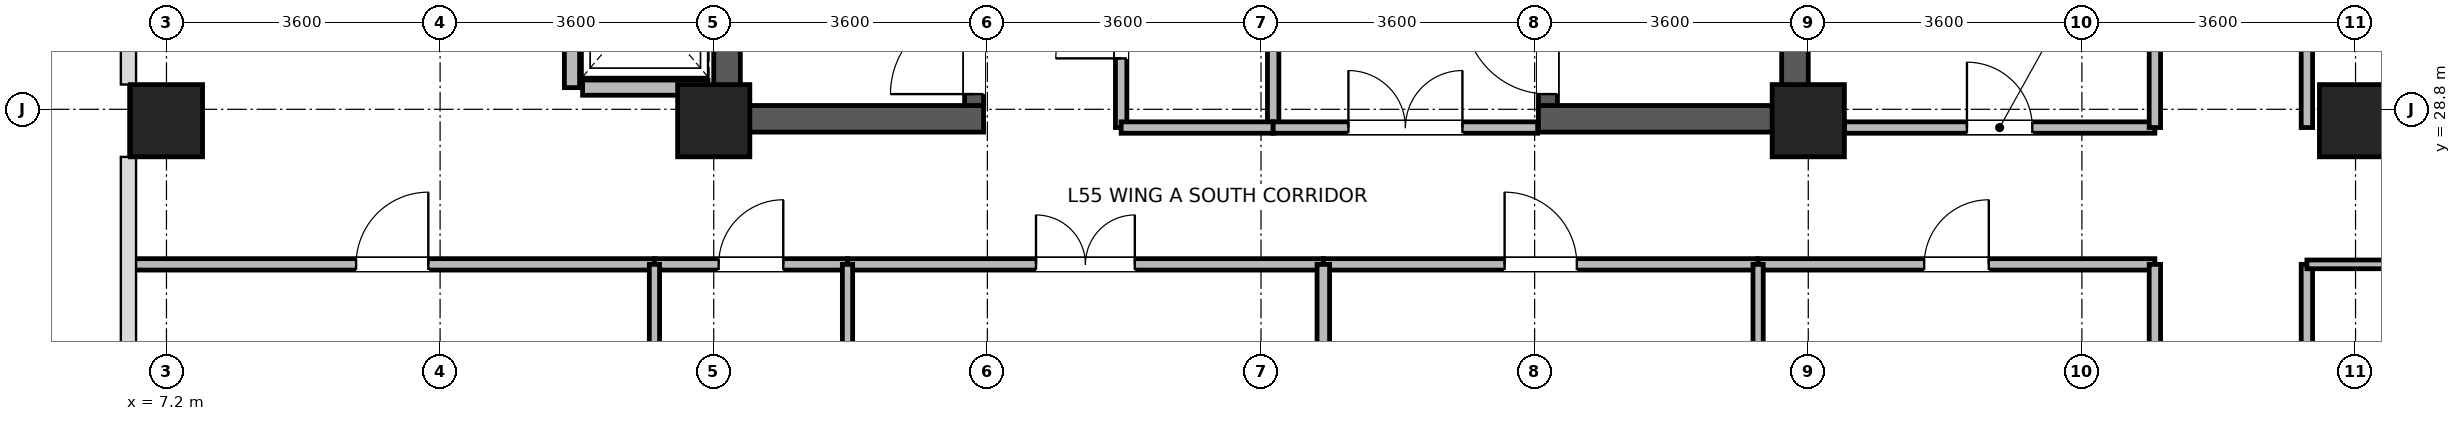
"""IFC4 building model, lengths in metres.
Left out: names, types, materials, properties, quantities, classifications, styles, units other than length and angle.
Written with IfcOpenShell. Run it as: python <this file> out.ifc"""

import sys

from ifc_helpers import new_model, si_unit, direction, frame, frame_2d, origin, origin_2d, place, context, subcontext, project, spatial, rectangle, extrude, source, transform, mapped, element, fill, save


model = new_model("IFC4")
c1 = context("Model", 3, precision=1e-05, world=origin(), true_north=direction((0.0, 1.0)))
c2 = subcontext(c1, "Body", "Model", "MODEL_VIEW")
j1 = project(units=[si_unit("LENGTHUNIT", "METRE"), si_unit("PLANEANGLEUNIT", "RADIAN")], contexts=[c1])
p1 = place(None, origin())
s1 = spatial("IfcSite", under=j1, at=p1, CompositionType="ELEMENT")
p2 = place(p1, origin())
s2 = spatial("IfcBuilding", under=s1, at=p2, CompositionType="ELEMENT")
p3 = place(p2, frame((0.0, 0.0, 216.6)))
s3 = spatial("IfcBuildingStorey", under=s2, at=p3, CompositionType="ELEMENT", Elevation=216.6)
for number, where, z_axis, x_axis in (
    (1, (14.575, 28.5, 0.0), (0.0, 0.0, 1.0), (0.0, 1.0, 0.0)),
    (2, (28.625, 28.5, 0.0), (0.0, 0.0, 1.0), (0.0, 1.0, 0.0)),
):
    element("IfcWall", number, at=place(p3, frame(where, z_axis=z_axis, x_axis=x_axis)), inside=s3, PredefinedType="SHEAR", context=c2, shape_type="SweptSolid", body=[
        extrude(rectangle(XDim=7.7, YDim=0.35, at=frame_2d((3.85, 0.0))), origin(), (0.0, 0.0, 1.0), 3.47),
    ])
for number, where, z_axis, x_axis in (
    (3, (14.75, 28.675, 0.0), (0.0, 0.0, 1.0), (1.0, 0.0, 0.0)),
    (4, (25.25, 28.675, 0.0), (0.0, 0.0, 1.0), (1.0, 0.0, 0.0)),
):
    element("IfcWall", number, at=place(p3, frame(where, z_axis=z_axis, x_axis=x_axis)), inside=s3, PredefinedType="SHEAR", context=c2, shape_type="SweptSolid", body=[
        extrude(rectangle(XDim=3.2, YDim=0.35, at=frame_2d((1.6, 0.0))), origin(), (0.0, 0.0, 1.0), 3.47),
    ])
p4 = place(p3, frame((17.825, 28.85, 0.0), z_axis=(0.0, 0.0, 1.0), x_axis=(0.0, 1.0, 0.0)))
e5 = element("IfcWall", 5, at=p4, inside=s3, PredefinedType="SHEAR", context=c2, shape_type="SweptSolid", body=[
    extrude(rectangle(XDim=7.0, YDim=0.25, at=frame_2d((3.5, 0.0))), origin(), (0.0, 0.0, 1.0), 3.47),
])
p5 = place(p4, frame((0.15, 0.0, 0.0)))
e6 = element("IfcOpeningElement", 6, at=p5, cuts=e5, PredefinedType="OPENING", context=c2, shape_type="SweptSolid", body=[
    extrude(rectangle(XDim=1.1, YDim=2.08, at=frame_2d((0.55, 1.04))), frame((0.0, 0.135, 0.0), z_axis=(0.0, -1.0, 0.0), x_axis=(1.0, 0.0, 0.0)), (0.0, 0.0, 1.0), 0.27),
])
p6 = place(p3, frame((25.375, 28.85, 0.0), z_axis=(0.0, 0.0, 1.0), x_axis=(0.0, 1.0, 0.0)))
e7 = element("IfcWall", 7, at=p6, inside=s3, PredefinedType="SHEAR", context=c2, shape_type="SweptSolid", body=[
    extrude(rectangle(XDim=7.0, YDim=0.25, at=frame_2d((3.5, 0.0))), origin(), (0.0, 0.0, 1.0), 3.47),
])
p7 = place(p6, frame((0.15, 0.0, 0.0)))
e8 = element("IfcOpeningElement", 8, at=p7, cuts=e7, PredefinedType="OPENING", context=c2, shape_type="SweptSolid", body=[
    extrude(rectangle(XDim=1.1, YDim=2.08, at=frame_2d((0.55, 1.04))), frame((0.0, 0.135, 0.0), z_axis=(0.0, -1.0, 0.0), x_axis=(1.0, 0.0, 0.0)), (0.0, 0.0, 1.0), 0.27),
])
m1 = source(origin(), c2, "Body", "SweptSolid", [
    extrude(rectangle(XDim=0.95, YDim=0.95, at=origin_2d()), origin(), (0.0, 0.0, 1.0), 3.7),
])
for number, where, z_axis, x_axis in (
    (9, (7.2, 28.65, 0.0), (0.0, 0.0, 1.0), (1.0, 0.0, 0.0)),
    (10, (14.4, 28.65, 0.0), (0.0, 0.0, 1.0), (1.0, 0.0, 0.0)),
    (11, (28.8, 28.65, 0.0), (0.0, 0.0, 1.0), (1.0, 0.0, 0.0)),
    (12, (36.0, 28.65, 0.0), (0.0, 0.0, 1.0), (1.0, 0.0, 0.0)),
):
    element("IfcColumn", number, at=place(p3, frame(where, z_axis=z_axis, x_axis=x_axis)), inside=s3, PredefinedType="COLUMN", context=c2, shape_type="MappedRepresentation", body=[
        mapped(m1, transform((0.0, 0.0, 0.0), x_axis=(1.0, 0.0, 0.0), y_axis=(0.0, 1.0, 0.0), z_axis=(0.0, 0.0, 1.0), scale=1.0)),
    ])
p8 = place(p3, frame((12.675, 29.085, 0.0), z_axis=(0.0, 0.0, 1.0), x_axis=(1.0, 0.0, 0.0)))
e13 = element("IfcWall", 13, at=p8, inside=s3, PredefinedType="PARTITIONING", context=c2, shape_type="SweptSolid", body=[
    extrude(rectangle(XDim=1.65, YDim=0.2, at=frame_2d((0.825, 0.0))), origin(), (0.0, 0.0, 1.0), 3.45),
])
p9 = place(p3, frame((12.535, 29.085, 0.0), z_axis=(0.0, 0.0, 1.0), x_axis=(0.0, 1.0, 0.0)))
e14 = element("IfcWall", 14, at=p9, inside=s3, PredefinedType="PARTITIONING", context=c2, shape_type="SweptSolid", body=[
    extrude(rectangle(XDim=2.23, YDim=0.2, at=frame_2d((1.115, 0.0))), origin(), (0.0, 0.0, 1.0), 3.45),
])
p10 = place(p3, frame((35.36, 16.96, 0.0), z_axis=(0.0, 0.0, 1.0), x_axis=(0.0, 1.0, 0.0)))
e15 = element("IfcWall", 15, at=p10, inside=s3, PredefinedType="PARTITIONING", context=c2, shape_type="SweptSolid", body=[
    extrude(rectangle(XDim=9.8, YDim=0.15, at=frame_2d((4.9, 0.0))), origin(), (0.0, 0.0, 1.0), 3.45),
])
p11 = place(p10, frame((2.486, 0.0, 0.0)))
e16 = element("IfcOpeningElement", 16, at=p11, cuts=e15, PredefinedType="OPENING", context=c2, shape_type="SweptSolid", body=[
    extrude(rectangle(XDim=1.3, YDim=2.12, at=frame_2d((0.65, 1.06))), frame((0.0, 0.085, 0.0), z_axis=(0.0, -1.0, 0.0), x_axis=(1.0, 0.0, 0.0)), (0.0, 0.0, 1.0), 0.17),
])
p12 = place(p3, frame((35.36, 28.56, 0.0), z_axis=(0.0, 0.0, 1.0), x_axis=(0.0, 1.0, 0.0)))
e17 = element("IfcWall", 17, at=p12, inside=s3, PredefinedType="PARTITIONING", context=c2, shape_type="SweptSolid", body=[
    extrude(rectangle(XDim=7.68, YDim=0.15, at=frame_2d((3.84, 0.0))), origin(), (0.0, 0.0, 1.0), 3.45),
])
p13 = place(p12, frame((3.19, 0.0, 0.0)))
e18 = element("IfcOpeningElement", 18, at=p13, cuts=e17, PredefinedType="OPENING", context=c2, shape_type="SweptSolid", body=[
    extrude(rectangle(XDim=1.3, YDim=2.12, at=frame_2d((0.65, 1.06))), frame((0.0, 0.085, 0.0), z_axis=(0.0, -1.0, 0.0), x_axis=(1.0, 0.0, 0.0)), (0.0, 0.0, 1.0), 0.17),
])
p14 = place(p3, frame((6.72, 26.76, 0.0), z_axis=(0.0, 0.0, 1.0), x_axis=(1.0, 0.0, 0.0)))
e19 = element("IfcWall", 19, at=p14, inside=s3, PredefinedType="PARTITIONING", context=c2, shape_type="SweptSolid", body=[
    extrude(rectangle(XDim=6.9, YDim=0.15, at=frame_2d((3.45, 0.0))), origin(), (0.0, 0.0, 1.0), 3.45),
])
p15 = place(p14, frame((2.975, 0.0, 0.0)))
e20 = element("IfcOpeningElement", 20, at=p15, cuts=e19, PredefinedType="OPENING", context=c2, shape_type="SweptSolid", body=[
    extrude(rectangle(XDim=0.95, YDim=2.1, at=frame_2d((0.475, 1.05))), frame((0.0, 0.085, 0.0), z_axis=(0.0, -1.0, 0.0), x_axis=(1.0, 0.0, 0.0)), (0.0, 0.0, 1.0), 0.17),
])
p16 = place(p3, frame((16.16, 26.76, 0.0), z_axis=(0.0, 0.0, 1.0), x_axis=(1.0, 0.0, 0.0)))
e21 = element("IfcWall", 21, at=p16, inside=s3, PredefinedType="PARTITIONING", context=c2, shape_type="SweptSolid", body=[
    extrude(rectangle(XDim=6.26, YDim=0.15, at=frame_2d((3.13, 0.0))), origin(), (0.0, 0.0, 1.0), 3.45),
])
p17 = place(p16, frame((2.48, 0.0, 0.0)))
e22 = element("IfcOpeningElement", 22, at=p17, cuts=e21, PredefinedType="OPENING", context=c2, shape_type="SweptSolid", body=[
    extrude(rectangle(XDim=1.3, YDim=2.12, at=frame_2d((0.65, 1.06))), frame((0.0, 0.085, 0.0), z_axis=(0.0, -1.0, 0.0), x_axis=(1.0, 0.0, 0.0)), (0.0, 0.0, 1.0), 0.17),
])
p18 = place(p3, frame((22.42, 26.76, 0.0), z_axis=(0.0, 0.0, 1.0), x_axis=(1.0, 0.0, 0.0)))
e23 = element("IfcWall", 23, at=p18, inside=s3, PredefinedType="PARTITIONING", context=c2, shape_type="SweptSolid", body=[
    extrude(rectangle(XDim=5.72, YDim=0.15, at=frame_2d((2.86, 0.0))), origin(), (0.0, 0.0, 1.0), 3.45),
])
p19 = place(p18, frame((2.385, 0.0, 0.0)))
e24 = element("IfcOpeningElement", 24, at=p19, cuts=e23, PredefinedType="OPENING", context=c2, shape_type="SweptSolid", body=[
    extrude(rectangle(XDim=0.95, YDim=2.1, at=frame_2d((0.475, 1.05))), frame((0.0, 0.085, 0.0), z_axis=(0.0, -1.0, 0.0), x_axis=(1.0, 0.0, 0.0)), (0.0, 0.0, 1.0), 0.17),
])
p20 = place(p3, frame((28.14, 26.76, 0.0), z_axis=(0.0, 0.0, 1.0), x_axis=(1.0, 0.0, 0.0)))
e25 = element("IfcWall", 25, at=p20, inside=s3, PredefinedType="PARTITIONING", context=c2, shape_type="SweptSolid", body=[
    extrude(rectangle(XDim=5.22, YDim=0.15, at=frame_2d((2.61, 0.0))), origin(), (0.0, 0.0, 1.0), 3.45),
])
p21 = place(p20, frame((2.185, 0.0, 0.0)))
e26 = element("IfcOpeningElement", 26, at=p21, cuts=e25, PredefinedType="OPENING", context=c2, shape_type="SweptSolid", body=[
    extrude(rectangle(XDim=0.85, YDim=2.04, at=frame_2d((0.425, 1.02))), frame((0.0, 0.085, 0.0), z_axis=(0.0, -1.0, 0.0), x_axis=(1.0, 0.0, 0.0)), (0.0, 0.0, 1.0), 0.17),
])
p22 = place(p3, frame((33.36, 21.6, 0.0), z_axis=(0.0, 0.0, 1.0), x_axis=(0.0, 1.0, 0.0)))
e27 = element("IfcWall", 27, at=p22, inside=s3, PredefinedType="PARTITIONING", context=c2, shape_type="SweptSolid", body=[
    extrude(rectangle(XDim=5.16, YDim=0.15, at=frame_2d((2.58, 0.0))), origin(), (0.0, 0.0, 1.0), 3.45),
])
p23 = place(p3, frame((29.275, 28.56, 0.0), z_axis=(0.0, 0.0, 1.0), x_axis=(1.0, 0.0, 0.0)))
e28 = element("IfcWall", 28, at=p23, inside=s3, PredefinedType="PARTITIONING", context=c2, shape_type="SweptSolid", body=[
    extrude(rectangle(XDim=4.085, YDim=0.15, at=frame_2d((2.042, 0.0))), origin(), (0.0, 0.0, 1.0), 2.9),
])
p24 = place(p23, frame((1.613, 0.0, 0.0)))
e29 = element("IfcOpeningElement", 29, at=p24, cuts=e28, PredefinedType="OPENING", context=c2, shape_type="SweptSolid", body=[
    extrude(rectangle(XDim=0.86, YDim=2.02, at=frame_2d((0.43, 1.01))), frame((0.0, 0.085, 0.0), z_axis=(0.0, -1.0, 0.0), x_axis=(1.0, 0.0, 0.0)), (0.0, 0.0, 1.0), 0.17),
])
p25 = place(p3, frame((33.36, 28.56, 0.0), z_axis=(0.0, 0.0, 1.0), x_axis=(0.0, 1.0, 0.0)))
e30 = element("IfcWall", 30, at=p25, inside=s3, PredefinedType="PARTITIONING", context=c2, shape_type="SweptSolid", body=[
    extrude(rectangle(XDim=3.08, YDim=0.15, at=frame_2d((1.54, 0.0))), origin(), (0.0, 0.0, 1.0), 3.45),
])
p26 = place(p3, frame((19.76, 28.56, 0.0), z_axis=(0.0, 0.0, 1.0), x_axis=(0.0, 1.0, 0.0)))
e31 = element("IfcWall", 31, at=p26, inside=s3, PredefinedType="PARTITIONING", context=c2, shape_type="SweptSolid", body=[
    extrude(rectangle(XDim=2.68, YDim=0.15, at=frame_2d((1.34, 0.0))), origin(), (0.0, 0.0, 1.0), 3.45),
])
p27 = place(p26, frame((0.91, 0.0, 0.0)))
e32 = element("IfcOpeningElement", 32, at=p27, cuts=e31, PredefinedType="OPENING", context=c2, shape_type="SweptSolid", body=[
    extrude(rectangle(XDim=0.86, YDim=2.02, at=frame_2d((0.43, 1.01))), frame((0.0, 0.085, 0.0), z_axis=(0.0, -1.0, 0.0), x_axis=(1.0, 0.0, 0.0)), (0.0, 0.0, 1.0), 0.17),
])
p28 = place(p3, frame((21.76, 28.56, 0.0), z_axis=(0.0, 0.0, 1.0), x_axis=(0.0, 1.0, 0.0)))
e33 = element("IfcWall", 33, at=p28, inside=s3, PredefinedType="PARTITIONING", context=c2, shape_type="SweptSolid", body=[
    extrude(rectangle(XDim=2.68, YDim=0.15, at=frame_2d((1.34, 0.0))), origin(), (0.0, 0.0, 1.0), 3.45),
])
p29 = place(p3, frame((13.62, 26.76, 0.0), z_axis=(0.0, 0.0, 1.0), x_axis=(1.0, 0.0, 0.0)))
e34 = element("IfcWall", 34, at=p29, inside=s3, PredefinedType="PARTITIONING", context=c2, shape_type="SweptSolid", body=[
    extrude(rectangle(XDim=2.54, YDim=0.15, at=frame_2d((1.27, 0.0))), origin(), (0.0, 0.0, 1.0), 3.45),
])
p30 = place(p29, frame((0.845, 0.0, 0.0)))
e35 = element("IfcOpeningElement", 35, at=p30, cuts=e34, PredefinedType="OPENING", context=c2, shape_type="SweptSolid", body=[
    extrude(rectangle(XDim=0.85, YDim=2.04, at=frame_2d((0.425, 1.02))), frame((0.0, 0.085, 0.0), z_axis=(0.0, -1.0, 0.0), x_axis=(1.0, 0.0, 0.0)), (0.0, 0.0, 1.0), 0.17),
])
p31 = place(p3, frame((19.76, 28.56, 0.0), z_axis=(0.0, 0.0, 1.0), x_axis=(1.0, 0.0, 0.0)))
e36 = element("IfcWall", 36, at=p31, inside=s3, PredefinedType="PARTITIONING", context=c2, shape_type="SweptSolid", body=[
    extrude(rectangle(XDim=2.0, YDim=0.15, at=frame_2d((1.0, 0.0))), origin(), (0.0, 0.0, 1.0), 2.55),
])
p32 = place(p3, frame((35.36, 26.76, 0.0), z_axis=(0.0, 0.0, 1.0), x_axis=(1.0, 0.0, 0.0)))
e37 = element("IfcWall", 37, at=p32, inside=s3, PredefinedType="PARTITIONING", context=c2, shape_type="SweptSolid", body=[
    extrude(rectangle(XDim=7.06, YDim=0.115, at=frame_2d((3.53, 0.0))), origin(), (0.0, 0.0, 1.0), 3.45),
])
for number, where, z_axis, x_axis in (
    (38, (13.62, 21.732, 0.0), (0.0, 0.0, 1.0), (0.0, 1.0, 0.0)),
    (39, (16.16, 21.732, 0.0), (0.0, 0.0, 1.0), (0.0, 1.0, 0.0)),
):
    element("IfcWall", number, at=place(p3, frame(where, z_axis=z_axis, x_axis=x_axis)), inside=s3, PredefinedType="PARTITIONING", context=c2, shape_type="SweptSolid", body=[
        extrude(rectangle(XDim=5.028, YDim=0.135, at=frame_2d((2.514, 0.0))), origin(), (0.0, 0.0, 1.0), 3.45),
    ])
p33 = place(p3, frame((22.42, 21.732, 0.0), z_axis=(0.0, 0.0, 1.0), x_axis=(0.0, 1.0, 0.0)))
e40 = element("IfcWall", 40, at=p33, inside=s3, PredefinedType="PARTITIONING", context=c2, shape_type="SweptSolid", body=[
    extrude(rectangle(XDim=5.028, YDim=0.165, at=frame_2d((2.514, 0.0))), origin(), (0.0, 0.0, 1.0), 3.45),
])
p34 = place(p3, frame((28.14, 21.732, 0.0), z_axis=(0.0, 0.0, 1.0), x_axis=(0.0, 1.0, 0.0)))
e41 = element("IfcWall", 41, at=p34, inside=s3, PredefinedType="PARTITIONING", context=c2, shape_type="SweptSolid", body=[
    extrude(rectangle(XDim=5.028, YDim=0.135, at=frame_2d((2.514, 0.0))), origin(), (0.0, 0.0, 1.0), 3.45),
])
p35 = place(p3, frame((21.76, 28.56, 0.0), z_axis=(0.0, 0.0, 1.0), x_axis=(1.0, 0.0, 0.0)))
e42 = element("IfcWall", 42, at=p35, inside=s3, PredefinedType="PARTITIONING", context=c2, shape_type="SweptSolid", body=[
    extrude(rectangle(XDim=3.48, YDim=0.15, at=frame_2d((1.74, 0.0))), origin(), (0.0, 0.0, 1.0), 2.55),
])
p36 = place(p35, frame((0.99, 0.0, 0.0)))
e43 = element("IfcOpeningElement", 43, at=p36, cuts=e42, PredefinedType="OPENING", context=c2, shape_type="SweptSolid", body=[
    extrude(rectangle(XDim=1.5, YDim=2.1, at=frame_2d((0.75, 1.05))), frame((0.0, 0.085, 0.0), z_axis=(0.0, -1.0, 0.0), x_axis=(1.0, 0.0, 0.0)), (0.0, 0.0, 1.0), 0.17),
])
p37 = place(p5, origin())
e44 = element("IfcDoor", 44, at=p37, inside=s3, OperationType="SINGLE_SWING_LEFT", PredefinedType="DOOR", context=c2, shape_type="SweptSolid", body=[
    extrude(rectangle(XDim=1.1, YDim=2.08, at=frame_2d((0.55, 1.04))), frame((0.0, 0.025, 0.0), z_axis=(0.0, -1.0, 0.0), x_axis=(1.0, 0.0, 0.0)), (0.0, 0.0, 1.0), 0.05),
])
fill(e6, e44)
p38 = place(p7, origin())
e45 = element("IfcDoor", 45, at=p38, inside=s3, OperationType="SINGLE_SWING_RIGHT", PredefinedType="DOOR", context=c2, shape_type="SweptSolid", body=[
    extrude(rectangle(XDim=1.1, YDim=2.08, at=frame_2d((0.55, 1.04))), frame((0.0, 0.025, 0.0), z_axis=(0.0, -1.0, 0.0), x_axis=(1.0, 0.0, 0.0)), (0.0, 0.0, 1.0), 0.05),
])
fill(e8, e45)
p39 = place(p15, origin())
e46 = element("IfcDoor", 46, at=p39, inside=s3, OperationType="SINGLE_SWING_RIGHT", PredefinedType="DOOR", context=c2, shape_type="SweptSolid", body=[
    extrude(rectangle(XDim=0.95, YDim=2.1, at=frame_2d((0.475, 1.05))), frame((0.0, 0.025, 0.0), z_axis=(0.0, -1.0, 0.0), x_axis=(1.0, 0.0, 0.0)), (0.0, 0.0, 1.0), 0.05),
])
fill(e20, e46)
p40 = place(p17, origin())
e47 = element("IfcDoor", 47, at=p40, inside=s3, OperationType="DOUBLE_DOOR_SINGLE_SWING", PredefinedType="DOOR", context=c2, shape_type="SweptSolid", body=[
    extrude(rectangle(XDim=1.3, YDim=2.12, at=frame_2d((0.65, 1.06))), frame((0.0, 0.025, 0.0), z_axis=(0.0, -1.0, 0.0), x_axis=(1.0, 0.0, 0.0)), (0.0, 0.0, 1.0), 0.05),
])
fill(e22, e47)
p41 = place(p19, origin())
e48 = element("IfcDoor", 48, at=p41, inside=s3, OperationType="SINGLE_SWING_LEFT", PredefinedType="DOOR", context=c2, shape_type="SweptSolid", body=[
    extrude(rectangle(XDim=0.95, YDim=2.1, at=frame_2d((0.475, 1.05))), frame((0.0, 0.025, 0.0), z_axis=(0.0, -1.0, 0.0), x_axis=(1.0, 0.0, 0.0)), (0.0, 0.0, 1.0), 0.05),
])
fill(e24, e48)
p42 = place(p21, origin())
e49 = element("IfcDoor", 49, at=p42, inside=s3, OperationType="SINGLE_SWING_RIGHT", PredefinedType="DOOR", context=c2, shape_type="SweptSolid", body=[
    extrude(rectangle(XDim=0.85, YDim=2.04, at=frame_2d((0.425, 1.02))), frame((0.0, 0.025, 0.0), z_axis=(0.0, -1.0, 0.0), x_axis=(1.0, 0.0, 0.0)), (0.0, 0.0, 1.0), 0.05),
])
fill(e26, e49)
p43 = place(p24, origin())
e50 = element("IfcDoor", 50, at=p43, inside=s3, OperationType="SINGLE_SWING_LEFT", PredefinedType="DOOR", context=c2, shape_type="SweptSolid", body=[
    extrude(rectangle(XDim=0.86, YDim=2.02, at=frame_2d((0.43, 1.01))), frame((0.0, 0.025, 0.0), z_axis=(0.0, -1.0, 0.0), x_axis=(1.0, 0.0, 0.0)), (0.0, 0.0, 1.0), 0.05),
])
fill(e29, e50)
p44 = place(p27, origin())
e51 = element("IfcDoor", 51, at=p44, inside=s3, OperationType="SINGLE_SWING_LEFT", PredefinedType="DOOR", context=c2, shape_type="SweptSolid", body=[
    extrude(rectangle(XDim=0.86, YDim=2.02, at=frame_2d((0.43, 1.01))), frame((0.0, 0.025, 0.0), z_axis=(0.0, -1.0, 0.0), x_axis=(1.0, 0.0, 0.0)), (0.0, 0.0, 1.0), 0.05),
])
fill(e32, e51)
p45 = place(p30, origin())
e52 = element("IfcDoor", 52, at=p45, inside=s3, OperationType="SINGLE_SWING_RIGHT", PredefinedType="DOOR", context=c2, shape_type="SweptSolid", body=[
    extrude(rectangle(XDim=0.85, YDim=2.04, at=frame_2d((0.425, 1.02))), frame((0.0, 0.025, 0.0), z_axis=(0.0, -1.0, 0.0), x_axis=(1.0, 0.0, 0.0)), (0.0, 0.0, 1.0), 0.05),
])
fill(e35, e52)
p46 = place(p36, origin())
e53 = element("IfcDoor", 53, at=p46, inside=s3, OperationType="DOUBLE_DOOR_SINGLE_SWING", PredefinedType="DOOR", context=c2, shape_type="SweptSolid", body=[
    extrude(rectangle(XDim=1.5, YDim=2.1, at=frame_2d((0.75, 1.05))), frame((0.0, 0.025, 0.0), z_axis=(0.0, -1.0, 0.0), x_axis=(1.0, 0.0, 0.0)), (0.0, 0.0, 1.0), 0.05),
])
fill(e43, e53)
save(model, sys.argv[1])
